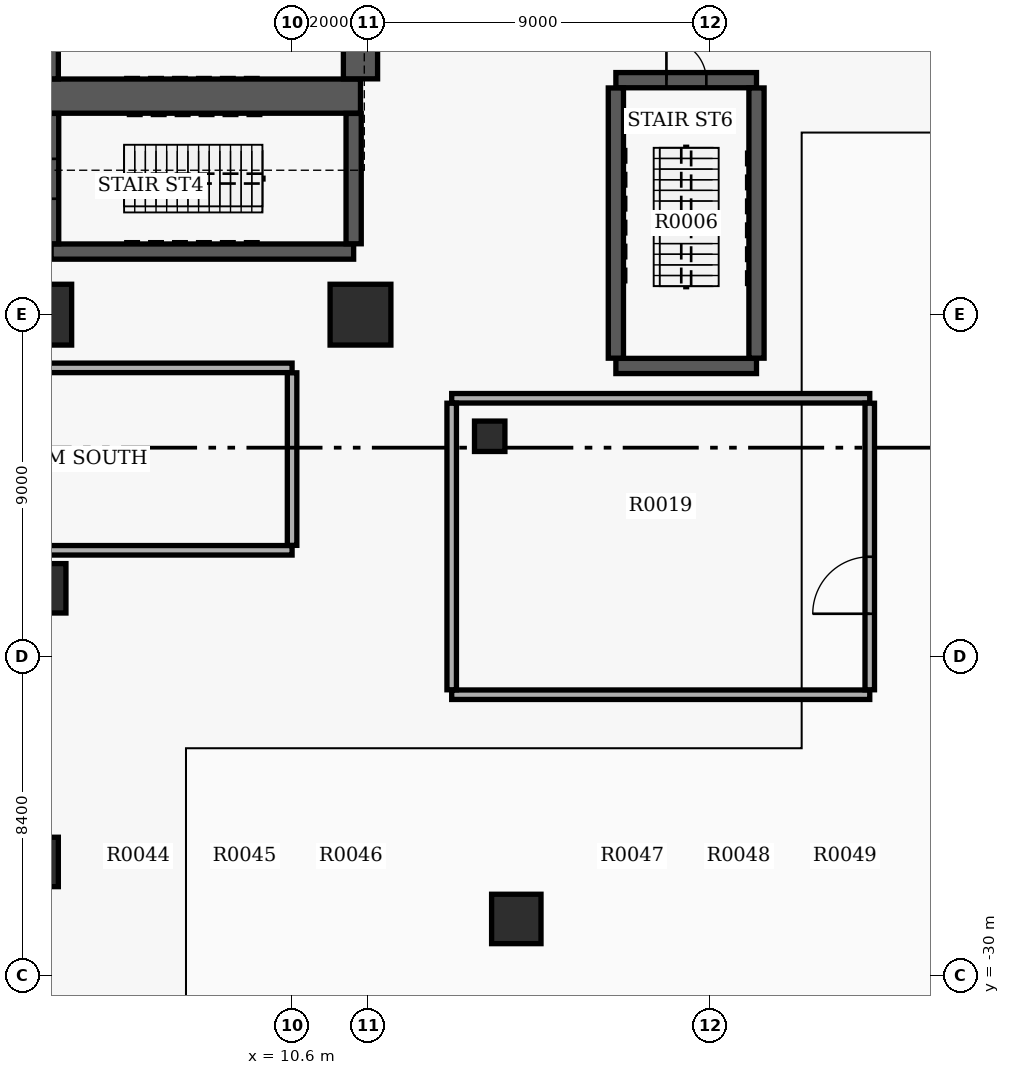
"""IFC4 building model, lengths in metres.
Left out: names, types, materials, properties, quantities, classifications, styles, units other than length and angle.
Written with IfcOpenShell. Run it as: python <this file> out.ifc"""

import sys

from ifc_helpers import new_model, si_unit, direction, frame, frame_2d, origin, origin_2d, place, context, subcontext, project, spatial, rectangle, circle, extrude, element, fill, save


model = new_model("IFC4")
c1 = context("Model", 3, precision=1e-05, world=origin(), true_north=direction((0.0, 1.0)))
c2 = subcontext(c1, "Body", "Model", "MODEL_VIEW")
j1 = project(units=[si_unit("LENGTHUNIT", "METRE"), si_unit("PLANEANGLEUNIT", "RADIAN")], contexts=[c1])
p1 = place(None, origin())
s1 = spatial("IfcSite", under=j1, at=p1, CompositionType="ELEMENT")
p2 = place(p1, origin())
s2 = spatial("IfcBuilding", under=s1, at=p2, CompositionType="ELEMENT")
p3 = place(p2, frame((0.0, 0.0, -10.4)))
s3 = spatial("IfcBuildingStorey", under=s2, at=p3, CompositionType="ELEMENT", Elevation=-10.4)
p4 = place(p3, frame((15.8, -15.8, 0.0), z_axis=(0.0, 0.0, 1.0), x_axis=(1.0, 0.0, 0.0)))
e1 = element("IfcColumn", 1, at=p4, inside=s3, PredefinedType="COLUMN", context=c2, shape_type="SweptSolid", body=[
    extrude(rectangle(XDim=0.8, YDim=0.8, at=origin_2d()), origin(), (0.0, 0.0, 1.0), 5.2),
])
p5 = place(p3, frame((4.0, -6.85, 0.0), z_axis=(0.0, 0.0, 1.0), x_axis=(1.0, 0.0, 0.0)))
e2 = element("IfcWall", 2, at=p5, inside=s3, PredefinedType="SHEAR", context=c2, shape_type="SweptSolid", body=[
    extrude(rectangle(XDim=8.4, YDim=0.9, at=frame_2d((4.2, 0.0))), origin(), (0.0, 0.0, 1.0), 4.85),
])
p6 = place(p3, frame((4.0, -6.395, 0.0), z_axis=(0.0, 0.0, 1.0), x_axis=(0.0, 1.0, 0.0)))
e3 = element("IfcWall", 3, at=p6, inside=s3, PredefinedType="SHEAR", context=c2, shape_type="SweptSolid", body=[
    extrude(rectangle(XDim=10.89, YDim=0.9, at=frame_2d((5.445, 0.0))), origin(), (0.0, 0.0, 1.0), 4.85),
])
p7 = place(p6, frame((1.145, 0.0, 0.0)))
e4 = element("IfcOpeningElement", 4, at=p7, cuts=e3, PredefinedType="OPENING", context=c2, shape_type="SweptSolid", body=[
    extrude(rectangle(XDim=1.05, YDim=2.15, at=frame_2d((0.525, 1.075))), frame((0.0, 0.46, 0.0), z_axis=(0.0, -1.0, 0.0), x_axis=(1.0, 0.0, 0.0)), (0.0, 0.0, 1.0), 0.92),
])
p8 = place(p6, frame((6.745, 0.0, 0.0)))
e5 = element("IfcOpeningElement", 5, at=p8, cuts=e3, PredefinedType="OPENING", context=c2, shape_type="SweptSolid", body=[
    extrude(rectangle(XDim=1.05, YDim=2.15, at=frame_2d((0.525, 1.075))), frame((0.0, 0.46, 0.0), z_axis=(0.0, -1.0, 0.0), x_axis=(1.0, 0.0, 0.0)), (0.0, 0.0, 1.0), 0.92),
])
p9 = place(p3, frame((12.4, -6.395, 0.0), z_axis=(0.0, 0.0, 1.0), x_axis=(0.0, 1.0, 0.0)))
e6 = element("IfcWall", 6, at=p9, inside=s3, PredefinedType="SHEAR", context=c2, shape_type="SweptSolid", body=[
    extrude(rectangle(XDim=10.89, YDim=0.9, at=frame_2d((5.445, 0.0))), origin(), (0.0, 0.0, 1.0), 4.85),
])
p10 = place(p3, frame((4.26, -10.94, 0.0), z_axis=(0.0, 0.0, 1.0), x_axis=(1.0, 0.0, 0.0)))
e7 = element("IfcWall", 7, at=p10, inside=s3, PredefinedType="SHEAR", context=c2, shape_type="SweptSolid", body=[
    extrude(rectangle(XDim=7.96, YDim=0.4, at=frame_2d((3.98, 0.0))), origin(), (0.0, 0.0, 1.0), 4.85),
])
p11 = place(p3, frame((4.26, -10.735, 0.0), z_axis=(0.0, 0.0, 1.0), x_axis=(0.0, 1.0, 0.0)))
e8 = element("IfcWall", 8, at=p11, inside=s3, PredefinedType="SHEAR", context=c2, shape_type="SweptSolid", body=[
    extrude(rectangle(XDim=3.43, YDim=0.4, at=frame_2d((1.715, 0.0))), origin(), (0.0, 0.0, 1.0), 4.85),
])
p12 = place(p11, frame((1.185, 0.0, 0.0)))
e9 = element("IfcOpeningElement", 9, at=p12, cuts=e8, PredefinedType="OPENING", context=c2, shape_type="SweptSolid", body=[
    extrude(rectangle(XDim=1.05, YDim=2.15, at=frame_2d((0.525, 1.075))), frame((0.0, 0.21, 0.0), z_axis=(0.0, -1.0, 0.0), x_axis=(1.0, 0.0, 0.0)), (0.0, 0.0, 1.0), 0.42),
])
p13 = place(p3, frame((12.22, -10.735, 0.0), z_axis=(0.0, 0.0, 1.0), x_axis=(0.0, 1.0, 0.0)))
e10 = element("IfcWall", 10, at=p13, inside=s3, PredefinedType="SHEAR", context=c2, shape_type="SweptSolid", body=[
    extrude(rectangle(XDim=3.43, YDim=0.4, at=frame_2d((1.715, 0.0))), origin(), (0.0, 0.0, 1.0), 4.85),
])
p14 = place(p3, frame((19.12, -6.43, 0.0), z_axis=(0.0, 0.0, 1.0), x_axis=(1.0, 0.0, 0.0)))
e11 = element("IfcWall", 11, at=p14, inside=s3, PredefinedType="SHEAR", context=c2, shape_type="SweptSolid", body=[
    extrude(rectangle(XDim=3.7, YDim=0.4, at=frame_2d((1.85, 0.0))), origin(), (0.0, 0.0, 1.0), 4.85),
])
p15 = place(p14, frame((1.33, 0.0, 0.0)))
e12 = element("IfcOpeningElement", 12, at=p15, cuts=e11, PredefinedType="OPENING", context=c2, shape_type="SweptSolid", body=[
    extrude(rectangle(XDim=1.05, YDim=2.15, at=frame_2d((0.525, 1.075))), frame((0.0, 0.21, 0.0), z_axis=(0.0, -1.0, 0.0), x_axis=(1.0, 0.0, 0.0)), (0.0, 0.0, 1.0), 0.42),
])
p16 = place(p3, frame((19.12, -13.95, 0.0), z_axis=(0.0, 0.0, 1.0), x_axis=(1.0, 0.0, 0.0)))
e13 = element("IfcWall", 13, at=p16, inside=s3, PredefinedType="SHEAR", context=c2, shape_type="SweptSolid", body=[
    extrude(rectangle(XDim=3.7, YDim=0.4, at=frame_2d((1.85, 0.0))), origin(), (0.0, 0.0, 1.0), 4.85),
])
for number, where, z_axis, x_axis in (
    (14, (19.12, -13.745, 0.0), (0.0, 0.0, 1.0), (0.0, 1.0, 0.0)),
    (15, (22.82, -13.745, 0.0), (0.0, 0.0, 1.0), (0.0, 1.0, 0.0)),
):
    element("IfcWall", number, at=place(p3, frame(where, z_axis=z_axis, x_axis=x_axis)), inside=s3, PredefinedType="SHEAR", context=c2, shape_type="SweptSolid", body=[
        extrude(rectangle(XDim=7.11, YDim=0.4, at=frame_2d((3.555, 0.0))), origin(), (0.0, 0.0, 1.0), 4.85),
    ])
for number, where, z_axis, x_axis in (
    (16, (12.4, -12.6, 0.0), (0.0, 0.0, 1.0), (1.0, 0.0, 0.0)),
    (17, (4.0, -12.6, 0.0), (0.0, 0.0, 1.0), (1.0, 0.0, 0.0)),
):
    element("IfcColumn", number, at=place(p3, frame(where, z_axis=z_axis, x_axis=x_axis)), inside=s3, PredefinedType="COLUMN", context=c2, shape_type="SweptSolid", body=[
        extrude(rectangle(XDim=1.6, YDim=1.6, at=origin_2d()), origin(), (0.0, 0.0, 1.0), 5.2),
    ])
for number, where, z_axis, x_axis in (
    (18, (4.0, -19.8, 0.0), (0.0, 0.0, 1.0), (1.0, 0.0, 0.0)),
    (19, (3.8, -27.0, 0.0), (0.0, 0.0, 1.0), (1.0, 0.0, 0.0)),
):
    element("IfcColumn", number, at=place(p3, frame(where, z_axis=z_axis, x_axis=x_axis)), inside=s3, PredefinedType="COLUMN", context=c2, shape_type="SweptSolid", body=[
        extrude(rectangle(XDim=1.3, YDim=1.3, at=origin_2d()), origin(), (0.0, 0.0, 1.0), 5.2),
    ])
p17 = place(p3, frame((16.5, -28.5, 0.0), z_axis=(0.0, 0.0, 1.0), x_axis=(1.0, 0.0, 0.0)))
e20 = element("IfcColumn", 20, at=p17, inside=s3, PredefinedType="COLUMN", context=c2, shape_type="SweptSolid", body=[
    extrude(circle(Radius=0.65, at=origin_2d()), origin(), (0.0, 0.0, 1.0), 5.2),
])
for number, where, z_axis, x_axis in (
    (21, (14.8, -22.6, 0.0), (0.0, 0.0, 1.0), (1.0, 0.0, 0.0)),
    (22, (14.8, -14.8, 0.0), (0.0, 0.0, 1.0), (1.0, 0.0, 0.0)),
):
    element("IfcWall", number, at=place(p3, frame(where, z_axis=z_axis, x_axis=x_axis)), inside=s3, PredefinedType="SOLIDWALL", context=c2, shape_type="SweptSolid", body=[
        extrude(rectangle(XDim=11.0, YDim=0.25, at=frame_2d((5.5, 0.0))), origin(), (0.0, 0.0, 1.0), 3.87),
    ])
p18 = place(p3, frame((14.8, -22.47, 0.0), z_axis=(0.0, 0.0, 1.0), x_axis=(0.0, 1.0, 0.0)))
e23 = element("IfcWall", 23, at=p18, inside=s3, PredefinedType="SOLIDWALL", context=c2, shape_type="SweptSolid", body=[
    extrude(rectangle(XDim=7.54, YDim=0.25, at=frame_2d((3.77, 0.0))), origin(), (0.0, 0.0, 1.0), 3.87),
])
p19 = place(p3, frame((25.8, -22.47, 0.0), z_axis=(0.0, 0.0, 1.0), x_axis=(0.0, 1.0, 0.0)))
e24 = element("IfcWall", 24, at=p19, inside=s3, PredefinedType="SOLIDWALL", context=c2, shape_type="SweptSolid", body=[
    extrude(rectangle(XDim=7.54, YDim=0.25, at=frame_2d((3.77, 0.0))), origin(), (0.0, 0.0, 1.0), 3.87),
])
p20 = place(p19, frame((2.0, 0.0, 0.0)))
e25 = element("IfcOpeningElement", 25, at=p20, cuts=e24, PredefinedType="OPENING", context=c2, shape_type="SweptSolid", body=[
    extrude(rectangle(XDim=1.5, YDim=2.15, at=frame_2d((0.75, 1.075))), frame((0.0, 0.135, 0.0), z_axis=(0.0, -1.0, 0.0), x_axis=(1.0, 0.0, 0.0)), (0.0, 0.0, 1.0), 0.27),
])
p21 = place(p3, frame((-10.6, -18.8, 0.0), z_axis=(0.0, 0.0, 1.0), x_axis=(1.0, 0.0, 0.0)))
e26 = element("IfcWall", 26, at=p21, inside=s3, PredefinedType="SOLIDWALL", context=c2, shape_type="SweptSolid", body=[
    extrude(rectangle(XDim=21.2, YDim=0.25, at=frame_2d((10.6, 0.0))), origin(), (0.0, 0.0, 1.0), 3.87),
])
p22 = place(p21, frame((9.8, 0.0, 0.0)))
e27 = element("IfcOpeningElement", 27, at=p22, cuts=e26, PredefinedType="OPENING", context=c2, shape_type="SweptSolid", body=[
    extrude(rectangle(XDim=1.5, YDim=2.15, at=frame_2d((0.75, 1.075))), frame((0.0, 0.135, 0.0), z_axis=(0.0, -1.0, 0.0), x_axis=(1.0, 0.0, 0.0)), (0.0, 0.0, 1.0), 0.27),
])
p23 = place(p3, frame((-10.6, -14.0, 0.0), z_axis=(0.0, 0.0, 1.0), x_axis=(1.0, 0.0, 0.0)))
e28 = element("IfcWall", 28, at=p23, inside=s3, PredefinedType="SOLIDWALL", context=c2, shape_type="SweptSolid", body=[
    extrude(rectangle(XDim=21.2, YDim=0.25, at=frame_2d((10.6, 0.0))), origin(), (0.0, 0.0, 1.0), 3.87),
])
p24 = place(p3, frame((10.6, -18.67, 0.0), z_axis=(0.0, 0.0, 1.0), x_axis=(0.0, 1.0, 0.0)))
e29 = element("IfcWall", 29, at=p24, inside=s3, PredefinedType="SOLIDWALL", context=c2, shape_type="SweptSolid", body=[
    extrude(rectangle(XDim=4.54, YDim=0.25, at=frame_2d((2.27, 0.0))), origin(), (0.0, 0.0, 1.0), 3.87),
])
p25 = place(p15, origin())
e30 = element("IfcDoor", 30, at=p25, inside=s3, OperationType="SINGLE_SWING_LEFT", PredefinedType="DOOR", context=c2, shape_type="SweptSolid", body=[
    extrude(rectangle(XDim=1.05, YDim=2.15, at=frame_2d((0.525, 1.075))), frame((0.0, 0.025, 0.0), z_axis=(0.0, -1.0, 0.0), x_axis=(1.0, 0.0, 0.0)), (0.0, 0.0, 1.0), 0.05),
])
fill(e12, e30)
p26 = place(p20, origin())
e31 = element("IfcDoor", 31, at=p26, inside=s3, OperationType="DOUBLE_DOOR_SINGLE_SWING", PredefinedType="DOOR", context=c2, shape_type="SweptSolid", body=[
    extrude(rectangle(XDim=1.5, YDim=2.15, at=frame_2d((0.75, 1.075))), frame((0.0, 0.025, 0.0), z_axis=(0.0, -1.0, 0.0), x_axis=(1.0, 0.0, 0.0)), (0.0, 0.0, 1.0), 0.05),
])
fill(e25, e31)
save(model, sys.argv[1])
